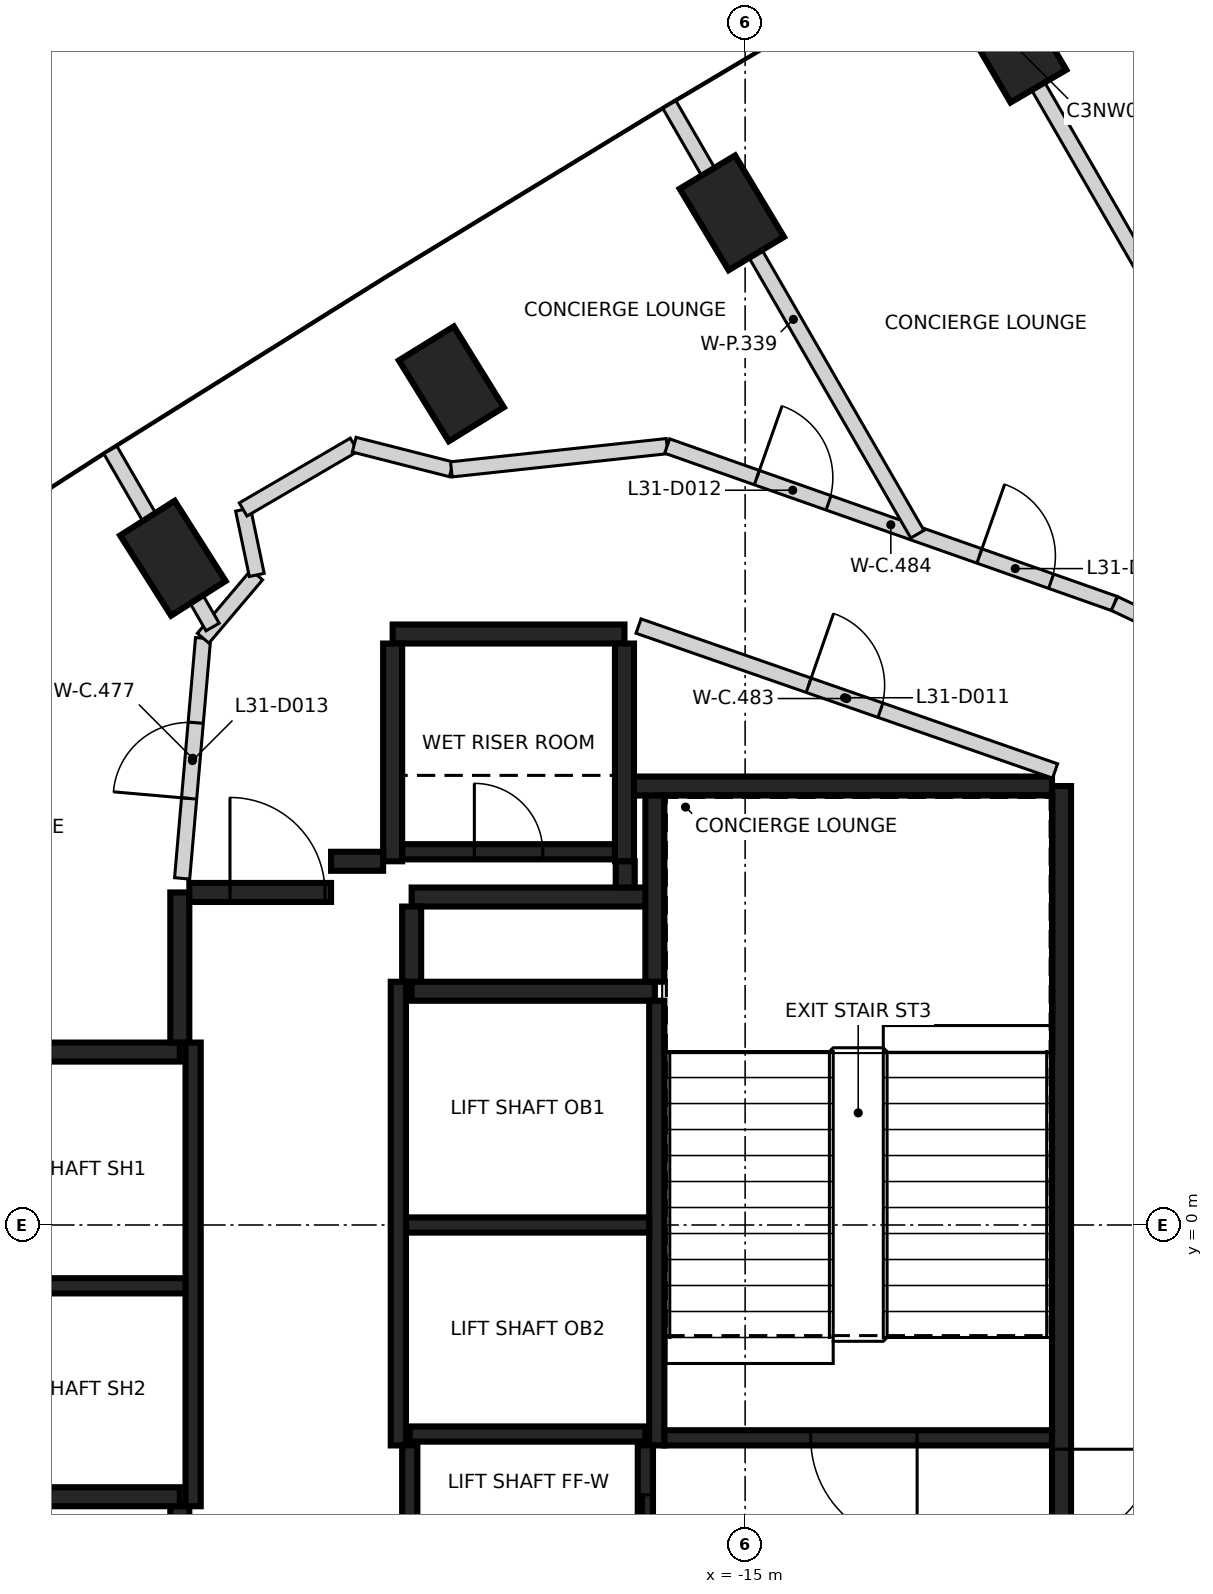
"""IFC4 building model, lengths in metres.
Left out: names, types, materials, properties, quantities, classifications, styles, units other than length and angle.
Written with IfcOpenShell. Run it as: python <this file> out.ifc"""

import sys

from ifc_helpers import new_model, si_unit, direction, frame, frame_2d, origin, origin_2d, place, context, subcontext, project, spatial, rectangle, extrude, element, fill, save


model = new_model("IFC4")
c1 = context("Model", 3, precision=1e-05, world=origin(), true_north=direction((0.0, 1.0)))
c2 = subcontext(c1, "Body", "Model", "MODEL_VIEW")
j1 = project(units=[si_unit("LENGTHUNIT", "METRE"), si_unit("PLANEANGLEUNIT", "RADIAN")], contexts=[c1])
p1 = place(None, origin())
s1 = spatial("IfcSite", under=j1, at=p1, CompositionType="ELEMENT")
p2 = place(p1, origin())
s2 = spatial("IfcBuilding", under=s1, at=p2, CompositionType="ELEMENT")
p3 = place(p2, frame((0.0, 0.0, 128.8)))
s3 = spatial("IfcBuildingStorey", under=s2, at=p3, CompositionType="ELEMENT", Elevation=128.8)
for number, where, z_axis, x_axis in (
    (1, (-11.457, 15.522, -0.4), (0.0, 0.0, 1.0), (-0.505, 0.863, 0.0)),
    (2, (-15.175, 13.316, -0.4), (0.0, 0.0, 1.0), (-0.515, 0.857, 0.0)),
    (3, (-18.865, 11.066, -0.4), (0.0, 0.0, 1.0), (-0.526, 0.851, 0.0)),
    (4, (-22.529, 8.772, -0.4), (0.0, 0.0, 1.0), (-0.536, 0.844, 0.0)),
):
    element("IfcColumn", number, at=place(p3, frame(where, z_axis=z_axis, x_axis=x_axis)), inside=s3, PredefinedType="COLUMN", context=c2, shape_type="SweptSolid", body=[
        extrude(rectangle(XDim=1.25, YDim=0.85, at=origin_2d()), origin(), (0.0, 0.0, 1.0), 3.6),
    ])
p4 = place(p3, frame((-10.837, 5.775, 0.0), z_axis=(0.0, 0.0, 1.0), x_axis=(0.0, -1.0, 0.0)))
e5 = element("IfcWall", 5, at=p4, inside=s3, PredefinedType="SHEAR", context=c2, shape_type="SweptSolid", body=[
    extrude(rectangle(XDim=11.55, YDim=0.25, at=frame_2d((5.775, 0.0))), origin(), (0.0, 0.0, 1.0), 3.2),
])
p5 = place(p4, frame((10.025, 0.0, 0.0)))
e6 = element("IfcOpeningElement", 6, at=p5, cuts=e5, PredefinedType="OPENING", context=c2, shape_type="SweptSolid", body=[
    extrude(rectangle(XDim=1.2, YDim=2.1, at=frame_2d((0.6, 1.05))), frame((0.0, 0.135, 0.0), z_axis=(0.0, -1.0, 0.0), x_axis=(1.0, 0.0, 0.0)), (0.0, 0.0, 1.0), 0.27),
])
p6 = place(p4, frame((8.725, 0.0, 0.0)))
e7 = element("IfcOpeningElement", 7, at=p6, cuts=e5, PredefinedType="OPENING", context=c2, shape_type="SweptSolid", body=[
    extrude(rectangle(XDim=1.2, YDim=2.1, at=frame_2d((0.6, 1.05))), frame((0.0, 0.135, 0.0), z_axis=(0.0, -1.0, 0.0), x_axis=(1.0, 0.0, 0.0)), (0.0, 0.0, 1.0), 0.27),
])
p7 = place(p3, frame((-16.472, 5.775, 0.0), z_axis=(0.0, 0.0, 1.0), x_axis=(1.0, 0.0, 0.0)))
e8 = element("IfcWall", 8, at=p7, inside=s3, PredefinedType="SHEAR", context=c2, shape_type="SweptSolid", body=[
    extrude(rectangle(XDim=5.51, YDim=0.25, at=frame_2d((2.755, 0.0))), origin(), (0.0, 0.0, 1.0), 3.2),
])
p8 = place(p3, frame((-19.387, 3.075, 0.0), z_axis=(0.0, 0.0, 1.0), x_axis=(1.0, 0.0, 0.0)))
e9 = element("IfcWall", 9, at=p8, inside=s3, PredefinedType="SHEAR", context=c2, shape_type="SweptSolid", body=[
    extrude(rectangle(XDim=3.2, YDim=0.25, at=frame_2d((1.6, 0.0))), origin(), (0.0, 0.0, 1.0), 3.2),
])
for number, where, z_axis, x_axis in (
    (10, (-22.437, -3.575, 0.0), (0.0, 0.0, 1.0), (-1.0, 0.0, 0.0)),
    (11, (-25.412, 2.275, 0.0), (0.0, 0.0, 1.0), (1.0, 0.0, 0.0)),
):
    element("IfcWall", number, at=place(p3, frame(where, z_axis=z_axis, x_axis=x_axis)), inside=s3, PredefinedType="SHEAR", context=c2, shape_type="SweptSolid", body=[
        extrude(rectangle(XDim=2.975, YDim=0.25, at=frame_2d((1.487, 0.0))), origin(), (0.0, 0.0, 1.0), 3.2),
    ])
p9 = place(p3, frame((-19.637, 7.775, 0.0), z_axis=(0.0, 0.0, 1.0), x_axis=(1.0, 0.0, 0.0)))
e12 = element("IfcWall", 12, at=p9, inside=s3, PredefinedType="SHEAR", context=c2, shape_type="SweptSolid", body=[
    extrude(rectangle(XDim=3.05, YDim=0.25, at=frame_2d((1.525, 0.0))), origin(), (0.0, 0.0, 1.0), 3.2),
])
for number, where, z_axis, x_axis in (
    (13, (-16.587, 7.65, 0.0), (0.0, 0.0, 1.0), (0.0, -1.0, 0.0)),
    (14, (-19.637, 4.785, 0.0), (0.0, 0.0, 1.0), (0.0, 1.0, 0.0)),
):
    element("IfcWall", number, at=place(p3, frame(where, z_axis=z_axis, x_axis=x_axis)), inside=s3, PredefinedType="SHEAR", context=c2, shape_type="SweptSolid", body=[
        extrude(rectangle(XDim=2.865, YDim=0.25, at=frame_2d((1.432, 0.0))), origin(), (0.0, 0.0, 1.0), 3.2),
    ])
p10 = place(p3, frame((-16.302, 4.315, 0.0), z_axis=(0.0, 0.0, 1.0), x_axis=(-1.0, 0.0, 0.0)))
e15 = element("IfcWall", 15, at=p10, inside=s3, PredefinedType="SHEAR", context=c2, shape_type="SweptSolid", body=[
    extrude(rectangle(XDim=3.085, YDim=0.25, at=frame_2d((1.542, 0.0))), origin(), (0.0, 0.0, 1.0), 3.2),
])
p11 = place(p3, frame((-16.187, 3.2, 0.0), z_axis=(0.0, 0.0, 1.0), x_axis=(0.0, 1.0, 0.0)))
e16 = element("IfcWall", 16, at=p11, inside=s3, PredefinedType="SHEAR", context=c2, shape_type="SweptSolid", body=[
    extrude(rectangle(XDim=2.449, YDim=0.25, at=frame_2d((1.225, 0.0))), origin(), (0.0, 0.0, 1.0), 3.2),
])
p12 = place(p3, frame((-22.437, 2.4, 0.0), z_axis=(0.0, 0.0, 1.0), x_axis=(0.0, 1.0, 0.0)))
e17 = element("IfcWall", 17, at=p12, inside=s3, PredefinedType="SHEAR", context=c2, shape_type="SweptSolid", body=[
    extrude(rectangle(XDim=1.975, YDim=0.25, at=frame_2d((0.987, 0.0))), origin(), (0.0, 0.0, 1.0), 3.2),
])
p13 = place(p3, frame((-22.437, -5.55, 0.0), z_axis=(0.0, 0.0, 1.0), x_axis=(0.0, 1.0, 0.0)))
e18 = element("IfcWall", 18, at=p13, inside=s3, PredefinedType="SHEAR", context=c2, shape_type="SweptSolid", body=[
    extrude(rectangle(XDim=1.849, YDim=0.25, at=frame_2d((0.925, 0.0))), origin(), (0.0, 0.0, 1.0), 3.2),
])
p14 = place(p3, frame((-22.312, 4.375, 0.0), z_axis=(0.0, 0.0, 1.0), x_axis=(1.0, 0.0, 0.0)))
e19 = element("IfcWall", 19, at=p14, inside=s3, PredefinedType="SHEAR", context=c2, shape_type="SweptSolid", body=[
    extrude(rectangle(XDim=1.865, YDim=0.25, at=frame_2d((0.932, 0.0))), origin(), (0.0, 0.0, 1.0), 3.2),
])
p15 = place(p14, frame((0.535, 0.0, 0.0)))
e20 = element("IfcOpeningElement", 20, at=p15, cuts=e19, PredefinedType="OPENING", context=c2, shape_type="SweptSolid", body=[
    extrude(rectangle(XDim=1.25, YDim=2.1, at=frame_2d((0.625, 1.05))), frame((0.0, 0.135, 0.0), z_axis=(0.0, -1.0, 0.0), x_axis=(1.0, 0.0, 0.0)), (0.0, 0.0, 1.0), 0.27),
])
p16 = place(p3, frame((-19.387, 4.19, 0.0), z_axis=(0.0, 0.0, 1.0), x_axis=(0.0, -1.0, 0.0)))
e21 = element("IfcWall", 21, at=p16, inside=s3, PredefinedType="SHEAR", context=c2, shape_type="SweptSolid", body=[
    extrude(rectangle(XDim=0.989, YDim=0.25, at=frame_2d((0.495, 0.0))), origin(), (0.0, 0.0, 1.0), 3.2),
])
p17 = place(p3, frame((-20.447, 4.785, 0.0), z_axis=(0.0, 0.0, 1.0), x_axis=(1.0, 0.0, 0.0)))
e22 = element("IfcWall", 22, at=p17, inside=s3, PredefinedType="SHEAR", context=c2, shape_type="SweptSolid", body=[
    extrude(rectangle(XDim=0.685, YDim=0.25, at=frame_2d((0.342, 0.0))), origin(), (0.0, 0.0, 1.0), 3.2),
])
p18 = place(p3, frame((-16.577, 4.785, 0.0), z_axis=(0.0, 0.0, 1.0), x_axis=(0.0, -1.0, 0.0)))
e23 = element("IfcWall", 23, at=p18, inside=s3, PredefinedType="SHEAR", context=c2, shape_type="SweptSolid", body=[
    extrude(rectangle(XDim=0.344, YDim=0.25, at=frame_2d((0.172, 0.0))), origin(), (0.0, 0.0, 1.0), 3.2),
])
p19 = place(p3, frame((-16.162, 2.951, 0.0), z_axis=(0.0, 0.0, 1.0), x_axis=(0.0, -1.0, 0.0)))
e24 = element("IfcWall", 24, at=p19, inside=s3, PredefinedType="SHEAR", context=c2, shape_type="SweptSolid", body=[
    extrude(rectangle(XDim=5.851, YDim=0.2, at=frame_2d((2.925, 0.0))), origin(), (0.0, 0.0, 1.0), 3.2),
])
for number, where, z_axis, x_axis in (
    (25, (-19.562, -2.9, 0.0), (0.0, 0.0, 1.0), (0.0, 1.0, 0.0)),
    (26, (-22.262, 2.4, 0.0), (0.0, 0.0, 1.0), (0.0, -1.0, 0.0)),
):
    element("IfcWall", number, at=place(p3, frame(where, z_axis=z_axis, x_axis=x_axis)), inside=s3, PredefinedType="SHEAR", context=c2, shape_type="SweptSolid", body=[
        extrude(rectangle(XDim=6.1, YDim=0.2, at=frame_2d((3.05, 0.0))), origin(), (0.0, 0.0, 1.0), 3.2),
    ])
p20 = place(p3, frame((-10.963, -2.8, 0.0), z_axis=(0.0, 0.0, 1.0), x_axis=(-1.0, 0.0, 0.0)))
e27 = element("IfcWall", 27, at=p20, inside=s3, PredefinedType="SHEAR", context=c2, shape_type="SweptSolid", body=[
    extrude(rectangle(XDim=5.098, YDim=0.2, at=frame_2d((2.549, 0.0))), origin(), (0.0, 0.0, 1.0), 3.2),
])
p21 = place(p20, frame((1.774, 0.0, 0.0)))
e28 = element("IfcOpeningElement", 28, at=p21, cuts=e27, PredefinedType="OPENING", context=c2, shape_type="SweptSolid", body=[
    extrude(rectangle(XDim=1.4, YDim=2.1, at=frame_2d((0.7, 1.05))), frame((0.0, 0.11, 0.0), z_axis=(0.0, -1.0, 0.0), x_axis=(1.0, 0.0, 0.0)), (0.0, 0.0, 1.0), 0.22),
])
p22 = place(p3, frame((-16.263, 0.0, 0.0), z_axis=(0.0, 0.0, 1.0), x_axis=(-1.0, 0.0, 0.0)))
e29 = element("IfcWall", 29, at=p22, inside=s3, PredefinedType="SHEAR", context=c2, shape_type="SweptSolid", body=[
    extrude(rectangle(XDim=3.198, YDim=0.2, at=frame_2d((1.599, 0.0))), origin(), (0.0, 0.0, 1.0), 3.2),
])
p23 = place(p3, frame((-22.363, -0.8, 0.0), z_axis=(0.0, 0.0, 1.0), x_axis=(-1.0, 0.0, 0.0)))
e30 = element("IfcWall", 30, at=p23, inside=s3, PredefinedType="SHEAR", context=c2, shape_type="SweptSolid", body=[
    extrude(rectangle(XDim=3.048, YDim=0.2, at=frame_2d((1.524, 0.0))), origin(), (0.0, 0.0, 1.0), 3.2),
])
p24 = place(p3, frame((-19.511, 4.91, 0.0), z_axis=(0.0, 0.0, 1.0), x_axis=(1.0, 0.0, 0.0)))
e31 = element("IfcWall", 31, at=p24, inside=s3, PredefinedType="SHEAR", context=c2, shape_type="SweptSolid", body=[
    extrude(rectangle(XDim=2.798, YDim=0.2, at=frame_2d((1.399, 0.0))), origin(), (0.0, 0.0, 1.0), 3.2),
])
p25 = place(p24, frame((0.949, 0.0, 0.0)))
e32 = element("IfcOpeningElement", 32, at=p25, cuts=e31, PredefinedType="OPENING", context=c2, shape_type="SweptSolid", body=[
    extrude(rectangle(XDim=0.9, YDim=2.1, at=frame_2d((0.45, 1.05))), frame((0.0, 0.11, 0.0), z_axis=(0.0, -1.0, 0.0), x_axis=(1.0, 0.0, 0.0)), (0.0, 0.0, 1.0), 0.22),
])
p26 = place(p3, frame((-19.412, -2.75, 0.0), z_axis=(0.0, 0.0, 1.0), x_axis=(1.0, 0.0, 0.0)))
e33 = element("IfcWall", 33, at=p26, inside=s3, PredefinedType="SHEAR", context=c2, shape_type="SweptSolid", body=[
    extrude(rectangle(XDim=3.1, YDim=0.2, at=frame_2d((1.55, 0.0))), origin(), (0.0, 0.0, 1.0), 3.2),
])
p27 = place(p3, frame((-16.312, -2.898, 0.0), z_axis=(0.0, 0.0, 1.0), x_axis=(0.0, -1.0, 0.0)))
e34 = element("IfcWall", 34, at=p27, inside=s3, PredefinedType="SHEAR", context=c2, shape_type="SweptSolid", body=[
    extrude(rectangle(XDim=2.651, YDim=0.2, at=frame_2d((1.325, 0.0))), origin(), (0.0, 0.0, 1.0), 3.2),
])
p28 = place(p27, frame((0.652, 0.0, 0.0)))
e35 = element("IfcOpeningElement", 35, at=p28, cuts=e34, PredefinedType="OPENING", context=c2, shape_type="SweptSolid", body=[
    extrude(rectangle(XDim=1.3, YDim=2.1, at=frame_2d((0.65, 1.05))), frame((0.0, 0.11, 0.0), z_axis=(0.0, -1.0, 0.0), x_axis=(1.0, 0.0, 0.0)), (0.0, 0.0, 1.0), 0.22),
])
p29 = place(p3, frame((-19.412, -5.549, 0.0), z_axis=(0.0, 0.0, 1.0), x_axis=(0.0, 1.0, 0.0)))
e36 = element("IfcWall", 36, at=p29, inside=s3, PredefinedType="SHEAR", context=c2, shape_type="SweptSolid", body=[
    extrude(rectangle(XDim=2.651, YDim=0.2, at=frame_2d((1.325, 0.0))), origin(), (0.0, 0.0, 1.0), 3.2),
])
p30 = place(p3, frame((-22.407, 4.56, 0.0), z_axis=(0.0, 0.0, 1.0), x_axis=(0.086898645684, 0.996217157741, 0.0)))
e37 = element("IfcWall", 37, at=p30, inside=s3, PredefinedType="PARTITIONING", context=c2, shape_type="SweptSolid", body=[
    extrude(rectangle(XDim=3.172, YDim=0.2, at=frame_2d((1.586, 0.0))), origin(), (0.0, 0.0, 1.0), 3.2),
])
p31 = place(p30, frame((1.056, 0.0, 0.0)))
e38 = element("IfcOpeningElement", 38, at=p31, cuts=e37, PredefinedType="OPENING", context=c2, shape_type="SweptSolid", body=[
    extrude(rectangle(XDim=1.0, YDim=2.1, at=frame_2d((0.5, 1.05))), frame((0.0, 0.11, 0.0), z_axis=(0.0, -1.0, 0.0), x_axis=(1.0, 0.0, 0.0)), (0.0, 0.0, 1.0), 0.22),
])
p32 = place(p3, frame((-22.13, 7.719, 0.0), z_axis=(0.0, 0.0, 1.0), x_axis=(0.646413536249, 0.762987247701, 0.0)))
e39 = element("IfcWall", 39, at=p32, inside=s3, PredefinedType="PARTITIONING", context=c2, shape_type="SweptSolid", body=[
    extrude(rectangle(XDim=1.091, YDim=0.2, at=frame_2d((0.545, 0.0))), origin(), (0.0, 0.0, 1.0), 3.2),
])
p33 = place(p3, frame((-21.605, 9.412, 0.0), z_axis=(0.0, 0.0, 1.0), x_axis=(0.204764111512, -0.978811349871, 0.0)))
e40 = element("IfcWall", 40, at=p33, inside=s3, PredefinedType="PARTITIONING", context=c2, shape_type="SweptSolid", body=[
    extrude(rectangle(XDim=0.879, YDim=0.2, at=frame_2d((0.439, 0.0))), origin(), (0.0, 0.0, 1.0), 2.3),
])
p34 = place(p3, frame((-21.604, 9.413, 0.0), z_axis=(0.0, 0.0, 1.0), x_axis=(0.863736988548, 0.503942868402, 0.0)))
e41 = element("IfcWall", 41, at=p34, inside=s3, PredefinedType="PARTITIONING", context=c2, shape_type="SweptSolid", body=[
    extrude(rectangle(XDim=1.69, YDim=0.2, at=frame_2d((0.845, 0.0))), origin(), (0.0, 0.0, 1.0), 2.3),
])
p35 = place(p3, frame((-20.143, 10.266, 0.0), z_axis=(0.0, 0.0, 1.0), x_axis=(0.969121308325, -0.246584447505, 0.0)))
e42 = element("IfcWall", 42, at=p35, inside=s3, PredefinedType="PARTITIONING", context=c2, shape_type="SweptSolid", body=[
    extrude(rectangle(XDim=1.319, YDim=0.2, at=frame_2d((0.659, 0.0))), origin(), (0.0, 0.0, 1.0), 2.3),
])
p36 = place(p3, frame((-18.865, 9.941, 0.0), z_axis=(0.0, 0.0, 1.0), x_axis=(0.99423123086, 0.107257911519, 0.0)))
e43 = element("IfcWall", 43, at=p36, inside=s3, PredefinedType="PARTITIONING", context=c2, shape_type="SweptSolid", body=[
    extrude(rectangle(XDim=2.854, YDim=0.2, at=frame_2d((1.427, 0.0))), origin(), (0.0, 0.0, 1.0), 3.2),
])
p37 = place(p3, frame((-16.402, 7.879, 0.0), z_axis=(0.0, 0.0, 1.0), x_axis=(0.944492255471, -0.328533680702, 0.0)))
e44 = element("IfcWall", 44, at=p37, inside=s3, PredefinedType="PARTITIONING", context=c2, shape_type="SweptSolid", body=[
    extrude(rectangle(XDim=5.802, YDim=0.2, at=frame_2d((2.901, 0.0))), origin(), (0.0, 0.0, 1.0), 3.2),
])
p38 = place(p37, frame((2.37, 0.0, 0.0)))
e45 = element("IfcOpeningElement", 45, at=p38, cuts=e44, PredefinedType="OPENING", context=c2, shape_type="SweptSolid", body=[
    extrude(rectangle(XDim=1.0, YDim=2.1, at=frame_2d((0.5, 1.05))), frame((0.0, 0.11, 0.0), z_axis=(0.0, -1.0, 0.0), x_axis=(1.0, 0.0, 0.0)), (0.0, 0.0, 1.0), 0.22),
])
p39 = place(p3, frame((-16.026, 10.248, 0.0), z_axis=(0.0, 0.0, 1.0), x_axis=(0.943234993827, -0.332126100179, 0.0)))
e46 = element("IfcWall", 46, at=p39, inside=s3, PredefinedType="PARTITIONING", context=c2, shape_type="SweptSolid", body=[
    extrude(rectangle(XDim=6.239, YDim=0.2, at=frame_2d((3.119, 0.0))), origin(), (0.0, 0.0, 1.0), 3.2),
])
p40 = place(p39, frame((4.355, 0.0, 0.0)))
e47 = element("IfcOpeningElement", 47, at=p40, cuts=e46, PredefinedType="OPENING", context=c2, shape_type="SweptSolid", body=[
    extrude(rectangle(XDim=1.0, YDim=2.1, at=frame_2d((0.5, 1.05))), frame((0.0, 0.11, 0.0), z_axis=(0.0, -1.0, 0.0), x_axis=(1.0, 0.0, 0.0)), (0.0, 0.0, 1.0), 0.22),
])
p41 = place(p39, frame((1.251, 0.0, 0.0)))
e48 = element("IfcOpeningElement", 48, at=p41, cuts=e46, PredefinedType="OPENING", context=c2, shape_type="SweptSolid", body=[
    extrude(rectangle(XDim=1.0, YDim=2.1, at=frame_2d((0.5, 1.05))), frame((0.0, 0.11, 0.0), z_axis=(0.0, -1.0, 0.0), x_axis=(1.0, 0.0, 0.0)), (0.0, 0.0, 1.0), 0.22),
])
p42 = place(p3, frame((-10.141, 8.176, 0.0), z_axis=(0.0, 0.0, 1.0), x_axis=(0.903904169039, -0.427735026849, 0.0)))
e49 = element("IfcWall", 49, at=p42, inside=s3, PredefinedType="PARTITIONING", context=c2, shape_type="SweptSolid", body=[
    extrude(rectangle(XDim=1.225, YDim=0.2, at=frame_2d((0.612, 0.0))), origin(), (0.0, 0.0, 1.0), 3.2),
])
p43 = place(p3, frame((-23.351, 10.197, 0.0), z_axis=(0.0, 0.0, 1.0), x_axis=(0.49992673358, -0.86606770004, 0.0)))
e50 = element("IfcWall", 50, at=p43, inside=s3, PredefinedType="PARTITIONING", context=c2, shape_type="SweptSolid", body=[
    extrude(rectangle(XDim=2.69, YDim=0.2, at=frame_2d((1.345, 0.0))), origin(), (0.0, 0.0, 1.0), 3.2),
])
p44 = place(p3, frame((-15.996, 14.74, 0.0), z_axis=(0.0, 0.0, 1.0), x_axis=(0.499925398456, -0.866068470722, 0.0)))
e51 = element("IfcWall", 51, at=p44, inside=s3, PredefinedType="PARTITIONING", context=c2, shape_type="SweptSolid", body=[
    extrude(rectangle(XDim=6.526, YDim=0.2, at=frame_2d((3.263, 0.0))), origin(), (0.0, 0.0, 1.0), 3.2),
])
p45 = place(p3, frame((-12.279, 16.946, 0.0), z_axis=(0.0, 0.0, 1.0), x_axis=(0.499902454835, -0.866081714187, 0.0)))
e52 = element("IfcWall", 52, at=p45, inside=s3, PredefinedType="PARTITIONING", context=c2, shape_type="SweptSolid", body=[
    extrude(rectangle(XDim=12.015, YDim=0.2, at=frame_2d((6.008, 0.0))), origin(), (0.0, 0.0, 1.0), 3.2),
])
p46 = place(p28, origin())
e53 = element("IfcDoor", 53, at=p46, inside=s3, OperationType="SLIDING_TO_LEFT", PredefinedType="DOOR", context=c2, shape_type="SweptSolid", body=[
    extrude(rectangle(XDim=1.3, YDim=2.1, at=frame_2d((0.65, 1.05))), frame((0.0, 0.025, 0.0), z_axis=(0.0, -1.0, 0.0), x_axis=(1.0, 0.0, 0.0)), (0.0, 0.0, 1.0), 0.05),
])
fill(e35, e53)
p47 = place(p15, origin())
e54 = element("IfcDoor", 54, at=p47, inside=s3, OperationType="SINGLE_SWING_LEFT", PredefinedType="DOOR", context=c2, shape_type="SweptSolid", body=[
    extrude(rectangle(XDim=1.25, YDim=2.1, at=frame_2d((0.625, 1.05))), frame((0.0, 0.025, 0.0), z_axis=(0.0, -1.0, 0.0), x_axis=(1.0, 0.0, 0.0)), (0.0, 0.0, 1.0), 0.05),
])
fill(e20, e54)
p48 = place(p6, origin())
e55 = element("IfcDoor", 55, at=p48, inside=s3, OperationType="SINGLE_SWING_RIGHT", PredefinedType="DOOR", context=c2, shape_type="SweptSolid", body=[
    extrude(rectangle(XDim=1.2, YDim=2.1, at=frame_2d((0.6, 1.05))), frame((0.0, 0.025, 0.0), z_axis=(0.0, -1.0, 0.0), x_axis=(1.0, 0.0, 0.0)), (0.0, 0.0, 1.0), 0.05),
])
fill(e7, e55)
p49 = place(p21, origin())
e56 = element("IfcDoor", 56, at=p49, inside=s3, OperationType="SINGLE_SWING_LEFT", PredefinedType="DOOR", context=c2, shape_type="SweptSolid", body=[
    extrude(rectangle(XDim=1.4, YDim=2.1, at=frame_2d((0.7, 1.05))), frame((0.0, 0.025, 0.0), z_axis=(0.0, -1.0, 0.0), x_axis=(1.0, 0.0, 0.0)), (0.0, 0.0, 1.0), 0.05),
])
fill(e28, e56)
p50 = place(p25, origin())
e57 = element("IfcDoor", 57, at=p50, inside=s3, OperationType="SINGLE_SWING_RIGHT", PredefinedType="DOOR", context=c2, shape_type="SweptSolid", body=[
    extrude(rectangle(XDim=0.9, YDim=2.1, at=frame_2d((0.45, 1.05))), frame((0.0, 0.025, 0.0), z_axis=(0.0, -1.0, 0.0), x_axis=(1.0, 0.0, 0.0)), (0.0, 0.0, 1.0), 0.05),
])
fill(e32, e57)
p51 = place(p40, origin())
e58 = element("IfcDoor", 58, at=p51, inside=s3, OperationType="SINGLE_SWING_LEFT", PredefinedType="DOOR", context=c2, shape_type="SweptSolid", body=[
    extrude(rectangle(XDim=1.0, YDim=2.1, at=frame_2d((0.5, 1.05))), frame((0.0, 0.025, 0.0), z_axis=(0.0, -1.0, 0.0), x_axis=(1.0, 0.0, 0.0)), (0.0, 0.0, 1.0), 0.05),
])
fill(e47, e58)
p52 = place(p38, frame((1.0, 0.0, 0.0), z_axis=(0.0, 0.0, 1.0), x_axis=(-1.0, 0.0, 0.0)))
e59 = element("IfcDoor", 59, at=p52, inside=s3, OperationType="SINGLE_SWING_LEFT", PredefinedType="DOOR", context=c2, shape_type="SweptSolid", body=[
    extrude(rectangle(XDim=1.0, YDim=2.1, at=frame_2d((0.5, 1.05))), frame((0.0, 0.025, 0.0), z_axis=(0.0, -1.0, 0.0), x_axis=(1.0, 0.0, 0.0)), (0.0, 0.0, 1.0), 0.05),
])
fill(e45, e59)
p53 = place(p41, origin())
e60 = element("IfcDoor", 60, at=p53, inside=s3, OperationType="SINGLE_SWING_LEFT", PredefinedType="DOOR", context=c2, shape_type="SweptSolid", body=[
    extrude(rectangle(XDim=1.0, YDim=2.1, at=frame_2d((0.5, 1.05))), frame((0.0, 0.025, 0.0), z_axis=(0.0, -1.0, 0.0), x_axis=(1.0, 0.0, 0.0)), (0.0, 0.0, 1.0), 0.05),
])
fill(e48, e60)
p54 = place(p31, origin())
e61 = element("IfcDoor", 61, at=p54, inside=s3, OperationType="SINGLE_SWING_LEFT", PredefinedType="DOOR", context=c2, shape_type="SweptSolid", body=[
    extrude(rectangle(XDim=1.0, YDim=2.1, at=frame_2d((0.5, 1.05))), frame((0.0, 0.025, 0.0), z_axis=(0.0, -1.0, 0.0), x_axis=(1.0, 0.0, 0.0)), (0.0, 0.0, 1.0), 0.05),
])
fill(e38, e61)
save(model, sys.argv[1])
